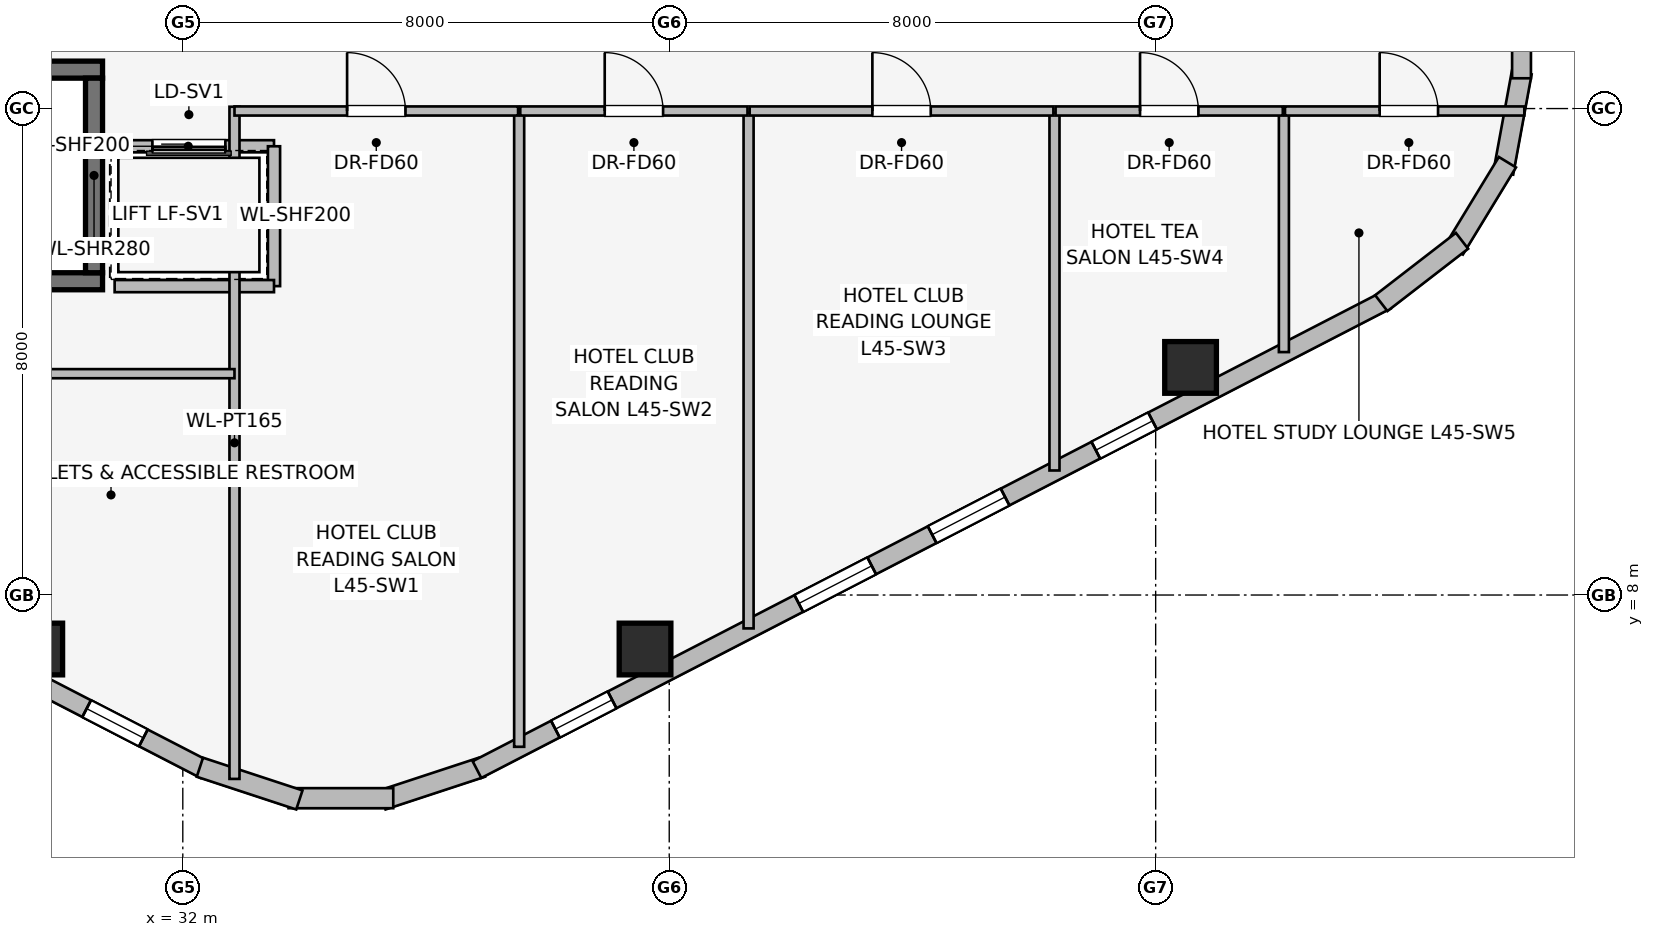
"""IFC4 building model, lengths in metres.
Left out: names, types, materials, properties, quantities, classifications, styles, units other than length and angle.
Written with IfcOpenShell. Run it as: python <this file> out.ifc"""

import sys

from ifc_helpers import new_model, si_unit, direction, frame, frame_2d, origin, origin_2d, place, context, subcontext, project, spatial, rectangle, extrude, element, fill, save


model = new_model("IFC4")
c1 = context("Model", 3, precision=1e-05, world=origin(), true_north=direction((0.0, 1.0)))
c2 = subcontext(c1, "Body", "Model", "MODEL_VIEW")
j1 = project(units=[si_unit("LENGTHUNIT", "METRE"), si_unit("PLANEANGLEUNIT", "RADIAN")], contexts=[c1])
p1 = place(None, origin())
s1 = spatial("IfcSite", under=j1, at=p1, CompositionType="ELEMENT")
p2 = place(p1, origin())
s2 = spatial("IfcBuilding", under=s1, at=p2, CompositionType="ELEMENT")
p3 = place(p2, frame((0.0, 0.0, 167.1)))
s3 = spatial("IfcBuildingStorey", under=s2, at=p3, CompositionType="ELEMENT", Elevation=167.1)
p4 = place(p3, frame((22.32, 13.16, 0.0), z_axis=(0.0, 0.0, 1.0), x_axis=(1.0, 0.0, 0.0)))
e1 = element("IfcWall", 1, at=p4, inside=s3, PredefinedType="SHEAR", context=c2, shape_type="SweptSolid", body=[
    extrude(rectangle(XDim=8.36, YDim=0.28, at=frame_2d((4.18, 0.0))), origin(), (0.0, 0.0, 1.0), 3.45),
])
p5 = place(p3, frame((30.68, 16.64, 0.0), z_axis=(0.0, 0.0, 1.0), x_axis=(-1.0, 0.0, 0.0)))
e2 = element("IfcWall", 2, at=p5, inside=s3, PredefinedType="SHEAR", context=c2, shape_type="SweptSolid", body=[
    extrude(rectangle(XDim=8.36, YDim=0.28, at=frame_2d((4.18, 0.0))), origin(), (0.0, 0.0, 1.0), 3.45),
])
p6 = place(p5, frame((6.08, 0.0, 0.0)))
e3 = element("IfcOpeningElement", 3, at=p6, cuts=e2, PredefinedType="OPENING", context=c2, shape_type="SweptSolid", body=[
    extrude(rectangle(XDim=1.05, YDim=2.0, at=frame_2d((0.525, 1.0))), frame((0.0, 0.15, 0.0), z_axis=(0.0, -1.0, 0.0), x_axis=(1.0, 0.0, 0.0)), (0.0, 0.0, 1.0), 0.3),
])
p7 = place(p3, frame((30.54, 13.3, 0.0), z_axis=(0.0, 0.0, 1.0), x_axis=(0.0, 1.0, 0.0)))
e4 = element("IfcWall", 4, at=p7, inside=s3, PredefinedType="SHEAR", context=c2, shape_type="SweptSolid", body=[
    extrude(rectangle(XDim=3.2, YDim=0.28, at=frame_2d((1.6, 0.0))), origin(), (0.0, 0.0, 1.0), 3.45),
])
for number, where, z_axis, x_axis in (
    (5, (29.598, 7.112, 0.0), (0.0, 0.0, 1.0), (1.0, 0.0, 0.0)),
    (6, (39.602, 7.112, 0.0), (0.0, 0.0, 1.0), (1.0, 0.0, 0.0)),
    (7, (48.574, 11.743, 0.0), (0.0, 0.0, 1.0), (1.0, 0.0, 0.0)),
):
    element("IfcColumn", number, at=place(p3, frame(where, z_axis=z_axis, x_axis=x_axis)), inside=s3, PredefinedType="COLUMN", context=c2, shape_type="SweptSolid", body=[
        extrude(rectangle(XDim=0.85, YDim=0.85, at=origin_2d()), origin(), (0.0, 0.0, 1.0), 3.45),
    ])
p8 = place(p3, frame((32.362, 5.129, 0.0), z_axis=(0.0, 0.0, 1.0), x_axis=(-0.888626188278, 0.458632202867, 0.0)))
e8 = element("IfcWall", 8, at=p8, inside=s3, PredefinedType="STANDARD", context=c2, shape_type="SweptSolid", body=[
    extrude(rectangle(XDim=16.828, YDim=0.31, at=frame_2d((8.414, 0.0))), origin(), (0.0, 0.0, 1.0), 3.19),
])
p9 = place(p8, frame((1.137, 0.0, 0.75)))
e9 = element("IfcOpeningElement", 9, at=p9, cuts=e8, PredefinedType="OPENING", context=c2, shape_type="SweptSolid", body=[
    extrude(rectangle(XDim=1.05, YDim=1.4, at=frame_2d((0.525, 0.7))), frame((0.0, 0.165, 0.0), z_axis=(0.0, -1.0, 0.0), x_axis=(1.0, 0.0, 0.0)), (0.0, 0.0, 1.0), 0.33),
])
p10 = place(p8, frame((4.768, 0.0, 0.75)))
e10 = element("IfcOpeningElement", 10, at=p10, cuts=e8, PredefinedType="OPENING", context=c2, shape_type="SweptSolid", body=[
    extrude(rectangle(XDim=1.35, YDim=1.45, at=frame_2d((0.675, 0.725))), frame((0.0, 0.165, 0.0), z_axis=(0.0, -1.0, 0.0), x_axis=(1.0, 0.0, 0.0)), (0.0, 0.0, 1.0), 0.33),
])
p11 = place(p8, frame((7.739, 0.0, 0.75)))
e11 = element("IfcOpeningElement", 11, at=p11, cuts=e8, PredefinedType="OPENING", context=c2, shape_type="SweptSolid", body=[
    extrude(rectangle(XDim=1.35, YDim=1.45, at=frame_2d((0.675, 0.725))), frame((0.0, 0.165, 0.0), z_axis=(0.0, -1.0, 0.0), x_axis=(1.0, 0.0, 0.0)), (0.0, 0.0, 1.0), 0.33),
])
p12 = place(p8, frame((10.71, 0.0, 0.75)))
e12 = element("IfcOpeningElement", 12, at=p12, cuts=e8, PredefinedType="OPENING", context=c2, shape_type="SweptSolid", body=[
    extrude(rectangle(XDim=1.35, YDim=1.45, at=frame_2d((0.675, 0.725))), frame((0.0, 0.165, 0.0), z_axis=(0.0, -1.0, 0.0), x_axis=(1.0, 0.0, 0.0)), (0.0, 0.0, 1.0), 0.33),
])
p13 = place(p8, frame((14.885, 0.0, 0.75)))
e13 = element("IfcOpeningElement", 13, at=p13, cuts=e8, PredefinedType="OPENING", context=c2, shape_type="SweptSolid", body=[
    extrude(rectangle(XDim=1.05, YDim=1.4, at=frame_2d((0.525, 0.7))), frame((0.0, 0.165, 0.0), z_axis=(0.0, -1.0, 0.0), x_axis=(1.0, 0.0, 0.0)), (0.0, 0.0, 1.0), 0.33),
])
p14 = place(p3, frame((36.919, 5.168, 0.0), z_axis=(0.0, 0.0, 1.0), x_axis=(-0.949937416267, -0.312440242569, 0.0)))
e14 = element("IfcWall", 14, at=p14, inside=s3, PredefinedType="STANDARD", context=c2, shape_type="SweptSolid", body=[
    extrude(rectangle(XDim=1.722, YDim=0.33, at=frame_2d((0.861, 0.0))), origin(), (0.0, 0.0, 1.0), 3.19),
])
p15 = place(p3, frame((35.461, 4.659, 0.0), z_axis=(0.0, 0.0, 1.0), x_axis=(-1.0, 0.0, 0.0)))
e15 = element("IfcWall", 15, at=p15, inside=s3, PredefinedType="STANDARD", context=c2, shape_type="SweptSolid", body=[
    extrude(rectangle(XDim=1.722, YDim=0.33, at=frame_2d((0.861, 0.0))), origin(), (0.0, 0.0, 1.0), 3.19),
])
p16 = place(p3, frame((33.917, 4.63, 0.0), z_axis=(0.0, 0.0, 1.0), x_axis=(-0.949937416267, 0.312440242569, 0.0)))
e16 = element("IfcWall", 16, at=p16, inside=s3, PredefinedType="STANDARD", context=c2, shape_type="SweptSolid", body=[
    extrude(rectangle(XDim=1.722, YDim=0.33, at=frame_2d((0.861, 0.0))), origin(), (0.0, 0.0, 1.0), 3.19),
])
p17 = place(p3, frame((51.792, 12.847, 0.0), z_axis=(0.0, 0.0, 1.0), x_axis=(-0.888626188278, -0.458632202867, 0.0)))
e17 = element("IfcWall", 17, at=p17, inside=s3, PredefinedType="STANDARD", context=c2, shape_type="SweptSolid", body=[
    extrude(rectangle(XDim=16.828, YDim=0.31, at=frame_2d((8.414, 0.0))), origin(), (0.0, 0.0, 1.0), 3.19),
])
p18 = place(p17, frame((4.325, 0.0, 0.75)))
e18 = element("IfcOpeningElement", 18, at=p18, cuts=e17, PredefinedType="OPENING", context=c2, shape_type="SweptSolid", body=[
    extrude(rectangle(XDim=1.05, YDim=1.4, at=frame_2d((0.525, 0.7))), frame((0.0, 0.165, 0.0), z_axis=(0.0, -1.0, 0.0), x_axis=(1.0, 0.0, 0.0)), (0.0, 0.0, 1.0), 0.33),
])
p19 = place(p17, frame((7.054, 0.0, 0.75)))
e19 = element("IfcOpeningElement", 19, at=p19, cuts=e17, PredefinedType="OPENING", context=c2, shape_type="SweptSolid", body=[
    extrude(rectangle(XDim=1.35, YDim=1.45, at=frame_2d((0.675, 0.725))), frame((0.0, 0.165, 0.0), z_axis=(0.0, -1.0, 0.0), x_axis=(1.0, 0.0, 0.0)), (0.0, 0.0, 1.0), 0.33),
])
p20 = place(p17, frame((9.522, 0.0, 0.75)))
e20 = element("IfcOpeningElement", 20, at=p20, cuts=e17, PredefinedType="OPENING", context=c2, shape_type="SweptSolid", body=[
    extrude(rectangle(XDim=1.35, YDim=1.45, at=frame_2d((0.675, 0.725))), frame((0.0, 0.165, 0.0), z_axis=(0.0, -1.0, 0.0), x_axis=(1.0, 0.0, 0.0)), (0.0, 0.0, 1.0), 0.33),
])
p21 = place(p17, frame((14.327, 0.0, 0.75)))
e21 = element("IfcOpeningElement", 21, at=p21, cuts=e17, PredefinedType="OPENING", context=c2, shape_type="SweptSolid", body=[
    extrude(rectangle(XDim=1.05, YDim=1.4, at=frame_2d((0.525, 0.7))), frame((0.0, 0.165, 0.0), z_axis=(0.0, -1.0, 0.0), x_axis=(1.0, 0.0, 0.0)), (0.0, 0.0, 1.0), 0.33),
])
p22 = place(p3, frame((54.021, 16.592, 0.0), z_axis=(0.0, 0.0, 1.0), x_axis=(-0.180717642671, -0.983535019014, 0.0)))
e22 = element("IfcWall", 22, at=p22, inside=s3, PredefinedType="STANDARD", context=c2, shape_type="SweptSolid", body=[
    extrude(rectangle(XDim=1.677, YDim=0.33, at=frame_2d((0.838, 0.0))), origin(), (0.0, 0.0, 1.0), 3.19),
])
p23 = place(p3, frame((53.785, 15.118, 0.0), z_axis=(0.0, 0.0, 1.0), x_axis=(-0.520219286058, -0.85403272444, 0.0)))
e23 = element("IfcWall", 23, at=p23, inside=s3, PredefinedType="STANDARD", context=c2, shape_type="SweptSolid", body=[
    extrude(rectangle(XDim=1.678, YDim=0.33, at=frame_2d((0.839, 0.0))), origin(), (0.0, 0.0, 1.0), 3.19),
])
p24 = place(p3, frame((53.038, 13.825, 0.0), z_axis=(0.0, 0.0, 1.0), x_axis=(-0.791464279355, -0.611215423976, 0.0)))
e24 = element("IfcWall", 24, at=p24, inside=s3, PredefinedType="STANDARD", context=c2, shape_type="SweptSolid", body=[
    extrude(rectangle(XDim=1.677, YDim=0.33, at=frame_2d((0.838, 0.0))), origin(), (0.0, 0.0, 1.0), 3.19),
])
p25 = place(p3, frame((54.017, 31.502, 0.0), z_axis=(0.0, 0.0, 1.0), x_axis=(0.0, -1.0, 0.0)))
e25 = element("IfcWall", 25, at=p25, inside=s3, PredefinedType="STANDARD", context=c2, shape_type="SweptSolid", body=[
    extrude(rectangle(XDim=15.004, YDim=0.31, at=frame_2d((7.502, 0.0))), origin(), (0.0, 0.0, 1.0), 3.19),
])
p26 = place(p25, frame((7.602, 0.0, 0.0)))
e26 = element("IfcOpeningElement", 26, at=p26, cuts=e25, PredefinedType="OPENING", context=c2, shape_type="SweptSolid", body=[
    extrude(rectangle(XDim=1.1, YDim=2.04, at=frame_2d((0.55, 1.02))), frame((0.0, 0.165, 0.0), z_axis=(0.0, -1.0, 0.0), x_axis=(1.0, 0.0, 0.0)), (0.0, 0.0, 1.0), 0.33),
])
p27 = place(p25, frame((4.353, 0.0, 0.75)))
e27 = element("IfcOpeningElement", 27, at=p27, cuts=e25, PredefinedType="OPENING", context=c2, shape_type="SweptSolid", body=[
    extrude(rectangle(XDim=2.0, YDim=1.5, at=frame_2d((1.0, 0.75))), frame((0.0, 0.165, 0.0), z_axis=(0.0, -1.0, 0.0), x_axis=(1.0, 0.0, 0.0)), (0.0, 0.0, 1.0), 0.33),
])
p28 = place(p25, frame((9.555, 0.0, 0.75)))
e28 = element("IfcOpeningElement", 28, at=p28, cuts=e25, PredefinedType="OPENING", context=c2, shape_type="SweptSolid", body=[
    extrude(rectangle(XDim=1.35, YDim=1.45, at=frame_2d((0.675, 0.725))), frame((0.0, 0.165, 0.0), z_axis=(0.0, -1.0, 0.0), x_axis=(1.0, 0.0, 0.0)), (0.0, 0.0, 1.0), 0.33),
])
p29 = place(p3, frame((33.5, 15.38, 0.0), z_axis=(0.0, 0.0, 1.0), x_axis=(-1.0, 0.0, 0.0)))
e29 = element("IfcWall", 29, at=p29, inside=s3, PredefinedType="PARTITIONING", context=c2, shape_type="SweptSolid", body=[
    extrude(rectangle(XDim=2.82, YDim=0.2, at=frame_2d((1.41, 0.0))), origin(), (0.0, 0.0, 1.0), 3.19),
])
p30 = place(p29, frame((0.8, 0.0, 0.0)))
e30 = element("IfcOpeningElement", 30, at=p30, cuts=e29, PredefinedType="OPENING", context=c2, shape_type="SweptSolid", body=[
    extrude(rectangle(XDim=1.2, YDim=2.2, at=frame_2d((0.6, 1.1))), frame((0.0, 0.11, 0.0), z_axis=(0.0, -1.0, 0.0), x_axis=(1.0, 0.0, 0.0)), (0.0, 0.0, 1.0), 0.22),
])
p31 = place(p3, frame((33.5, 13.08, 0.0), z_axis=(0.0, 0.0, 1.0), x_axis=(0.0, 1.0, 0.0)))
e31 = element("IfcWall", 31, at=p31, inside=s3, PredefinedType="PARTITIONING", context=c2, shape_type="SweptSolid", body=[
    extrude(rectangle(XDim=2.3, YDim=0.2, at=frame_2d((1.15, 0.0))), origin(), (0.0, 0.0, 1.0), 3.19),
])
p32 = place(p3, frame((30.879, 13.08, 0.0), z_axis=(0.0, 0.0, 1.0), x_axis=(1.0, 0.0, 0.0)))
e32 = element("IfcWall", 32, at=p32, inside=s3, PredefinedType="PARTITIONING", context=c2, shape_type="SweptSolid", body=[
    extrude(rectangle(XDim=2.621, YDim=0.2, at=frame_2d((1.311, 0.0))), origin(), (0.0, 0.0, 1.0), 3.19),
])
p33 = place(p3, frame((32.85, 4.976, 0.0), z_axis=(0.0, 0.0, 1.0), x_axis=(0.0, 1.0, 0.0)))
e33 = element("IfcWall", 33, at=p33, inside=s3, PredefinedType="PARTITIONING", context=c2, shape_type="SweptSolid", body=[
    extrude(rectangle(XDim=11.054, YDim=0.165, at=frame_2d((5.527, 0.0))), origin(), (0.0, 0.0, 1.0), 3.19),
])
p34 = place(p3, frame((19.757, 11.64, 0.0), z_axis=(0.0, 0.0, 1.0), x_axis=(1.0, 0.0, 0.0)))
e34 = element("IfcWall", 34, at=p34, inside=s3, PredefinedType="PARTITIONING", context=c2, shape_type="SweptSolid", body=[
    extrude(rectangle(XDim=13.093, YDim=0.15, at=frame_2d((6.546, 0.0))), origin(), (0.0, 0.0, 1.0), 3.19),
])
p35 = place(p34, frame((3.243, 0.0, 0.0)))
e35 = element("IfcOpeningElement", 35, at=p35, cuts=e34, PredefinedType="OPENING", context=c2, shape_type="SweptSolid", body=[
    extrude(rectangle(XDim=0.9, YDim=2.0, at=frame_2d((0.45, 1.0))), frame((0.0, 0.085, 0.0), z_axis=(0.0, -1.0, 0.0), x_axis=(1.0, 0.0, 0.0)), (0.0, 0.0, 1.0), 0.17),
])
p36 = place(p3, frame((37.532, 5.504, 0.0), z_axis=(0.0, 0.0, 1.0), x_axis=(0.0, 1.0, 0.0)))
e36 = element("IfcWall", 36, at=p36, inside=s3, PredefinedType="PARTITIONING", context=c2, shape_type="SweptSolid", body=[
    extrude(rectangle(XDim=10.426, YDim=0.165, at=frame_2d((5.213, 0.0))), origin(), (0.0, 0.0, 1.0), 3.19),
])
p37 = place(p3, frame((41.305, 7.451, 0.0), z_axis=(0.0, 0.0, 1.0), x_axis=(0.0, 1.0, 0.0)))
e37 = element("IfcWall", 37, at=p37, inside=s3, PredefinedType="PARTITIONING", context=c2, shape_type="SweptSolid", body=[
    extrude(rectangle(XDim=8.479, YDim=0.165, at=frame_2d((4.24, 0.0))), origin(), (0.0, 0.0, 1.0), 3.19),
])
p38 = place(p3, frame((46.336, 10.048, 0.0), z_axis=(0.0, 0.0, 1.0), x_axis=(0.0, 1.0, 0.0)))
e38 = element("IfcWall", 38, at=p38, inside=s3, PredefinedType="PARTITIONING", context=c2, shape_type="SweptSolid", body=[
    extrude(rectangle(XDim=5.882, YDim=0.165, at=frame_2d((2.941, 0.0))), origin(), (0.0, 0.0, 1.0), 3.19),
])
p39 = place(p3, frame((50.109, 11.995, 0.0), z_axis=(0.0, 0.0, 1.0), x_axis=(0.0, 1.0, 0.0)))
e39 = element("IfcWall", 39, at=p39, inside=s3, PredefinedType="PARTITIONING", context=c2, shape_type="SweptSolid", body=[
    extrude(rectangle(XDim=3.935, YDim=0.165, at=frame_2d((1.967, 0.0))), origin(), (0.0, 0.0, 1.0), 3.19),
])
p40 = place(p3, frame((32.85, 15.96, 0.0), z_axis=(0.0, 0.0, 1.0), x_axis=(1.0, 0.0, 0.0)))
e40 = element("IfcWall", 40, at=p40, inside=s3, PredefinedType="PARTITIONING", context=c2, shape_type="SweptSolid", body=[
    extrude(rectangle(XDim=4.664, YDim=0.15, at=frame_2d((2.332, 0.0))), origin(), (0.0, 0.0, 1.0), 3.19),
])
p41 = place(p40, frame((1.852, 0.0, 0.0)))
e41 = element("IfcOpeningElement", 41, at=p41, cuts=e40, PredefinedType="OPENING", context=c2, shape_type="SweptSolid", body=[
    extrude(rectangle(XDim=0.96, YDim=2.0, at=frame_2d((0.48, 1.0))), frame((0.0, 0.085, 0.0), z_axis=(0.0, -1.0, 0.0), x_axis=(1.0, 0.0, 0.0)), (0.0, 0.0, 1.0), 0.17),
])
p42 = place(p3, frame((37.55, 15.96, 0.0), z_axis=(0.0, 0.0, 1.0), x_axis=(1.0, 0.0, 0.0)))
e42 = element("IfcWall", 42, at=p42, inside=s3, PredefinedType="PARTITIONING", context=c2, shape_type="SweptSolid", body=[
    extrude(rectangle(XDim=3.737, YDim=0.15, at=frame_2d((1.869, 0.0))), origin(), (0.0, 0.0, 1.0), 3.19),
])
p43 = place(p42, frame((1.389, 0.0, 0.0)))
e43 = element("IfcOpeningElement", 43, at=p43, cuts=e42, PredefinedType="OPENING", context=c2, shape_type="SweptSolid", body=[
    extrude(rectangle(XDim=0.96, YDim=2.0, at=frame_2d((0.48, 1.0))), frame((0.0, 0.085, 0.0), z_axis=(0.0, -1.0, 0.0), x_axis=(1.0, 0.0, 0.0)), (0.0, 0.0, 1.0), 0.17),
])
p44 = place(p3, frame((41.323, 15.96, 0.0), z_axis=(0.0, 0.0, 1.0), x_axis=(1.0, 0.0, 0.0)))
e44 = element("IfcWall", 44, at=p44, inside=s3, PredefinedType="PARTITIONING", context=c2, shape_type="SweptSolid", body=[
    extrude(rectangle(XDim=4.995, YDim=0.15, at=frame_2d((2.498, 0.0))), origin(), (0.0, 0.0, 1.0), 3.19),
])
p45 = place(p44, frame((2.018, 0.0, 0.0)))
e45 = element("IfcOpeningElement", 45, at=p45, cuts=e44, PredefinedType="OPENING", context=c2, shape_type="SweptSolid", body=[
    extrude(rectangle(XDim=0.96, YDim=2.0, at=frame_2d((0.48, 1.0))), frame((0.0, 0.085, 0.0), z_axis=(0.0, -1.0, 0.0), x_axis=(1.0, 0.0, 0.0)), (0.0, 0.0, 1.0), 0.17),
])
p46 = place(p3, frame((46.354, 15.96, 0.0), z_axis=(0.0, 0.0, 1.0), x_axis=(1.0, 0.0, 0.0)))
e46 = element("IfcWall", 46, at=p46, inside=s3, PredefinedType="PARTITIONING", context=c2, shape_type="SweptSolid", body=[
    extrude(rectangle(XDim=3.737, YDim=0.15, at=frame_2d((1.869, 0.0))), origin(), (0.0, 0.0, 1.0), 3.19),
])
p47 = place(p46, frame((1.389, 0.0, 0.0)))
e47 = element("IfcOpeningElement", 47, at=p47, cuts=e46, PredefinedType="OPENING", context=c2, shape_type="SweptSolid", body=[
    extrude(rectangle(XDim=0.96, YDim=2.0, at=frame_2d((0.48, 1.0))), frame((0.0, 0.085, 0.0), z_axis=(0.0, -1.0, 0.0), x_axis=(1.0, 0.0, 0.0)), (0.0, 0.0, 1.0), 0.17),
])
p48 = place(p3, frame((50.127, 15.96, 0.0), z_axis=(0.0, 0.0, 1.0), x_axis=(1.0, 0.0, 0.0)))
e48 = element("IfcWall", 48, at=p48, inside=s3, PredefinedType="PARTITIONING", context=c2, shape_type="SweptSolid", body=[
    extrude(rectangle(XDim=3.936, YDim=0.15, at=frame_2d((1.968, 0.0))), origin(), (0.0, 0.0, 1.0), 3.19),
])
p49 = place(p48, frame((1.557, 0.0, 0.0)))
e49 = element("IfcOpeningElement", 49, at=p49, cuts=e48, PredefinedType="OPENING", context=c2, shape_type="SweptSolid", body=[
    extrude(rectangle(XDim=0.96, YDim=2.0, at=frame_2d((0.48, 1.0))), frame((0.0, 0.085, 0.0), z_axis=(0.0, -1.0, 0.0), x_axis=(1.0, 0.0, 0.0)), (0.0, 0.0, 1.0), 0.17),
])
p50 = place(p9, origin())
e50 = element("IfcWindow", 50, at=p50, inside=s3, PartitioningType="SINGLE_PANEL", PredefinedType="WINDOW", context=c2, shape_type="SweptSolid", body=[
    extrude(rectangle(XDim=1.05, YDim=1.4, at=frame_2d((0.525, 0.7))), frame((0.0, 0.03, 0.0), z_axis=(0.0, -1.0, 0.0), x_axis=(1.0, 0.0, 0.0)), (0.0, 0.0, 1.0), 0.06),
])
fill(e9, e50)
p51 = place(p18, origin())
e51 = element("IfcWindow", 51, at=p51, inside=s3, PartitioningType="SINGLE_PANEL", PredefinedType="WINDOW", context=c2, shape_type="SweptSolid", body=[
    extrude(rectangle(XDim=1.05, YDim=1.4, at=frame_2d((0.525, 0.7))), frame((0.0, 0.03, 0.0), z_axis=(0.0, -1.0, 0.0), x_axis=(1.0, 0.0, 0.0)), (0.0, 0.0, 1.0), 0.06),
])
fill(e18, e51)
p52 = place(p19, origin())
e52 = element("IfcWindow", 52, at=p52, inside=s3, PartitioningType="SINGLE_PANEL", PredefinedType="WINDOW", context=c2, shape_type="SweptSolid", body=[
    extrude(rectangle(XDim=1.35, YDim=1.45, at=frame_2d((0.675, 0.725))), frame((0.0, 0.03, 0.0), z_axis=(0.0, -1.0, 0.0), x_axis=(1.0, 0.0, 0.0)), (0.0, 0.0, 1.0), 0.06),
])
fill(e19, e52)
p53 = place(p20, origin())
e53 = element("IfcWindow", 53, at=p53, inside=s3, PartitioningType="SINGLE_PANEL", PredefinedType="WINDOW", context=c2, shape_type="SweptSolid", body=[
    extrude(rectangle(XDim=1.35, YDim=1.45, at=frame_2d((0.675, 0.725))), frame((0.0, 0.03, 0.0), z_axis=(0.0, -1.0, 0.0), x_axis=(1.0, 0.0, 0.0)), (0.0, 0.0, 1.0), 0.06),
])
fill(e20, e53)
p54 = place(p21, origin())
e54 = element("IfcWindow", 54, at=p54, inside=s3, PartitioningType="SINGLE_PANEL", PredefinedType="WINDOW", context=c2, shape_type="SweptSolid", body=[
    extrude(rectangle(XDim=1.05, YDim=1.4, at=frame_2d((0.525, 0.7))), frame((0.0, 0.03, 0.0), z_axis=(0.0, -1.0, 0.0), x_axis=(1.0, 0.0, 0.0)), (0.0, 0.0, 1.0), 0.06),
])
fill(e21, e54)
p55 = place(p30, origin())
e55 = element("IfcDoor", 55, at=p55, inside=s3, OperationType="SLIDING_TO_RIGHT", PredefinedType="DOOR", context=c2, shape_type="SweptSolid", body=[
    extrude(rectangle(XDim=1.2, YDim=2.2, at=frame_2d((0.6, 1.1))), frame((0.0, 0.025, 0.0), z_axis=(0.0, -1.0, 0.0), x_axis=(1.0, 0.0, 0.0)), (0.0, 0.0, 1.0), 0.05),
])
fill(e30, e55)
p56 = place(p41, origin())
e56 = element("IfcDoor", 56, at=p56, inside=s3, OperationType="SINGLE_SWING_LEFT", PredefinedType="DOOR", context=c2, shape_type="SweptSolid", body=[
    extrude(rectangle(XDim=0.96, YDim=2.0, at=frame_2d((0.48, 1.0))), frame((0.0, 0.025, 0.0), z_axis=(0.0, -1.0, 0.0), x_axis=(1.0, 0.0, 0.0)), (0.0, 0.0, 1.0), 0.05),
])
fill(e41, e56)
p57 = place(p43, origin())
e57 = element("IfcDoor", 57, at=p57, inside=s3, OperationType="SINGLE_SWING_LEFT", PredefinedType="DOOR", context=c2, shape_type="SweptSolid", body=[
    extrude(rectangle(XDim=0.96, YDim=2.0, at=frame_2d((0.48, 1.0))), frame((0.0, 0.025, 0.0), z_axis=(0.0, -1.0, 0.0), x_axis=(1.0, 0.0, 0.0)), (0.0, 0.0, 1.0), 0.05),
])
fill(e43, e57)
p58 = place(p45, origin())
e58 = element("IfcDoor", 58, at=p58, inside=s3, OperationType="SINGLE_SWING_LEFT", PredefinedType="DOOR", context=c2, shape_type="SweptSolid", body=[
    extrude(rectangle(XDim=0.96, YDim=2.0, at=frame_2d((0.48, 1.0))), frame((0.0, 0.025, 0.0), z_axis=(0.0, -1.0, 0.0), x_axis=(1.0, 0.0, 0.0)), (0.0, 0.0, 1.0), 0.05),
])
fill(e45, e58)
p59 = place(p47, origin())
e59 = element("IfcDoor", 59, at=p59, inside=s3, OperationType="SINGLE_SWING_LEFT", PredefinedType="DOOR", context=c2, shape_type="SweptSolid", body=[
    extrude(rectangle(XDim=0.96, YDim=2.0, at=frame_2d((0.48, 1.0))), frame((0.0, 0.025, 0.0), z_axis=(0.0, -1.0, 0.0), x_axis=(1.0, 0.0, 0.0)), (0.0, 0.0, 1.0), 0.05),
])
fill(e47, e59)
p60 = place(p49, origin())
e60 = element("IfcDoor", 60, at=p60, inside=s3, OperationType="SINGLE_SWING_LEFT", PredefinedType="DOOR", context=c2, shape_type="SweptSolid", body=[
    extrude(rectangle(XDim=0.96, YDim=2.0, at=frame_2d((0.48, 1.0))), frame((0.0, 0.025, 0.0), z_axis=(0.0, -1.0, 0.0), x_axis=(1.0, 0.0, 0.0)), (0.0, 0.0, 1.0), 0.05),
])
fill(e49, e60)
save(model, sys.argv[1])
